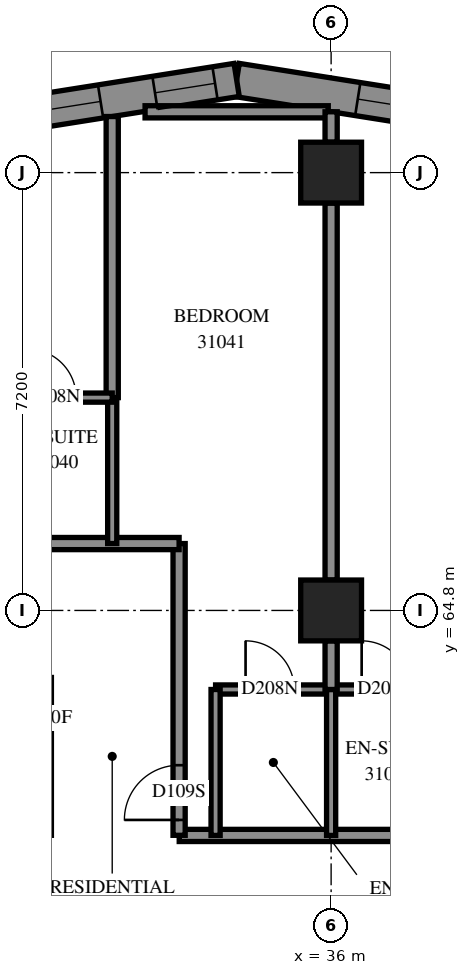
"""IFC4 building model, lengths in metres.
Left out: names, types, materials, properties, quantities, classifications, styles, units other than length and angle.
Written with IfcOpenShell. Run it as: python <this file> out.ifc"""

import sys

from ifc_helpers import new_model, si_unit, direction, frame, frame_2d, origin, origin_2d, place, context, subcontext, project, spatial, polyline, rectangle, outline, extrude, element, fill, save


model = new_model("IFC4")
c1 = context("Model", 3, precision=1e-05, world=origin(), true_north=direction((0.0, 1.0)))
c2 = subcontext(c1, "Body", "Model", "MODEL_VIEW")
j1 = project(units=[si_unit("LENGTHUNIT", "METRE"), si_unit("PLANEANGLEUNIT", "RADIAN")], contexts=[c1])
p1 = place(None, origin())
s1 = spatial("IfcSite", under=j1, at=p1, CompositionType="ELEMENT")
p2 = place(p1, origin())
s2 = spatial("IfcBuilding", under=s1, at=p2, CompositionType="ELEMENT")
p3 = place(p2, frame((0.0, 0.0, 115.2)))
s3 = spatial("IfcBuildingStorey", under=s2, at=p3, CompositionType="ELEMENT", Elevation=115.2)
for number, where, z_axis, x_axis in (
    (1, (36.0, 64.8, 0.0), (0.0, 0.0, 1.0), (1.0, 0.0, 0.0)),
    (2, (36.0, 72.0, 0.0), (0.0, 0.0, 1.0), (1.0, 0.0, 0.0)),
):
    element("IfcColumn", number, at=place(p3, frame(where, z_axis=z_axis, x_axis=x_axis)), inside=s3, PredefinedType="COLUMN", context=c2, shape_type="SweptSolid", body=[
        extrude(rectangle(XDim=1.0, YDim=1.0, at=origin_2d()), origin(), (0.0, 0.0, 1.0), 3.1),
    ])
p4 = place(p3, frame((38.259, 72.922, 0.0), z_axis=(0.0, 0.0, 1.0), x_axis=(-0.9877213372, 0.1562259905, 0.0)))
e3 = element("IfcWall", 3, at=p4, inside=s3, PredefinedType="SOLIDWALL", context=c2, shape_type="SweptSolid", body=[
    extrude(outline(polyline([(0.043, -0.275), (3.903, -0.275), (3.816, 0.275), (-0.043, 0.275), (0.043, -0.275)])), origin(), (0.0, 0.0, 1.0), 3.1),
])
p5 = place(p4, frame((0.643, 0.0, 0.5)))
e4 = element("IfcOpeningElement", 4, at=p5, cuts=e3, PredefinedType="OPENING", context=c2, shape_type="SweptSolid", body=[
    extrude(rectangle(XDim=1.2, YDim=2.45, at=frame_2d((0.6, 1.225))), frame((0.0, 0.285, 0.0), z_axis=(0.0, -1.0, 0.0), x_axis=(1.0, 0.0, 0.0)), (0.0, 0.0, 1.0), 0.57),
])
p6 = place(p3, frame((34.447, 73.525, 0.0), z_axis=(0.0, 0.0, 1.0), x_axis=(-0.9877213372, -0.1562259905, 0.0)))
e5 = element("IfcWall", 5, at=p6, inside=s3, PredefinedType="SOLIDWALL", context=c2, shape_type="SweptSolid", body=[
    extrude(outline(polyline([(-0.043, -0.275), (3.816, -0.275), (3.903, 0.275), (0.043, 0.275), (-0.043, -0.275)])), origin(), (0.0, 0.0, 1.0), 3.1),
])
p7 = place(p6, frame((2.266, 0.0, 0.5)))
e6 = element("IfcOpeningElement", 6, at=p7, cuts=e5, PredefinedType="OPENING", context=c2, shape_type="SweptSolid", body=[
    extrude(rectangle(XDim=1.2, YDim=2.45, at=frame_2d((0.6, 1.225))), frame((0.0, 0.285, 0.0), z_axis=(0.0, -1.0, 0.0), x_axis=(1.0, 0.0, 0.0)), (0.0, 0.0, 1.0), 0.57),
])
p8 = place(p6, frame((0.36, 0.0, 0.45)))
e7 = element("IfcOpeningElement", 7, at=p8, cuts=e5, PredefinedType="OPENING", context=c2, shape_type="SweptSolid", body=[
    extrude(rectangle(XDim=1.0, YDim=2.5, at=frame_2d((0.5, 1.25))), frame((0.0, 0.285, 0.0), z_axis=(0.0, -1.0, 0.0), x_axis=(1.0, 0.0, 0.0)), (0.0, 0.0, 1.0), 0.57),
])
p9 = place(p3, frame((33.502, 61.1, 0.0), z_axis=(0.0, 0.0, 1.0), x_axis=(1.0, 0.0, 0.0)))
e8 = element("IfcWall", 8, at=p9, inside=s3, PredefinedType="PARTITIONING", context=c2, shape_type="SweptSolid", body=[
    extrude(rectangle(XDim=21.198, YDim=0.2, at=frame_2d((10.599, 0.0))), origin(), (0.0, 0.0, 1.0), 3.1),
])
p10 = place(p9, frame((4.798, 0.0, 0.0)))
e9 = element("IfcOpeningElement", 9, at=p10, cuts=e8, PredefinedType="OPENING", context=c2, shape_type="SweptSolid", body=[
    extrude(rectangle(XDim=0.9, YDim=2.1, at=frame_2d((0.45, 1.05))), frame((0.0, 0.11, 0.0), z_axis=(0.0, -1.0, 0.0), x_axis=(1.0, 0.0, 0.0)), (0.0, 0.0, 1.0), 0.22),
])
p11 = place(p9, frame((6.498, 0.0, 0.0)))
e10 = element("IfcOpeningElement", 10, at=p11, cuts=e8, PredefinedType="OPENING", context=c2, shape_type="SweptSolid", body=[
    extrude(rectangle(XDim=0.9, YDim=2.1, at=frame_2d((0.45, 1.05))), frame((0.0, 0.11, 0.0), z_axis=(0.0, -1.0, 0.0), x_axis=(1.0, 0.0, 0.0)), (0.0, 0.0, 1.0), 0.22),
])
p12 = place(p9, frame((11.998, 0.0, 0.0)))
e11 = element("IfcOpeningElement", 11, at=p12, cuts=e8, PredefinedType="OPENING", context=c2, shape_type="SweptSolid", body=[
    extrude(rectangle(XDim=0.9, YDim=2.1, at=frame_2d((0.45, 1.05))), frame((0.0, 0.11, 0.0), z_axis=(0.0, -1.0, 0.0), x_axis=(1.0, 0.0, 0.0)), (0.0, 0.0, 1.0), 0.22),
])
p13 = place(p9, frame((13.698, 0.0, 0.0)))
e12 = element("IfcOpeningElement", 12, at=p13, cuts=e8, PredefinedType="OPENING", context=c2, shape_type="SweptSolid", body=[
    extrude(rectangle(XDim=0.9, YDim=2.1, at=frame_2d((0.45, 1.05))), frame((0.0, 0.11, 0.0), z_axis=(0.0, -1.0, 0.0), x_axis=(1.0, 0.0, 0.0)), (0.0, 0.0, 1.0), 0.22),
])
p14 = place(p9, frame((19.198, 0.0, 0.0)))
e13 = element("IfcOpeningElement", 13, at=p14, cuts=e8, PredefinedType="OPENING", context=c2, shape_type="SweptSolid", body=[
    extrude(rectangle(XDim=0.9, YDim=2.1, at=frame_2d((0.45, 1.05))), frame((0.0, 0.11, 0.0), z_axis=(0.0, -1.0, 0.0), x_axis=(1.0, 0.0, 0.0)), (0.0, 0.0, 1.0), 0.22),
])
p15 = place(p3, frame((36.0, 65.3, 0.0), z_axis=(0.0, 0.0, 1.0), x_axis=(0.0, 1.0, 0.0)))
e14 = element("IfcWall", 14, at=p15, inside=s3, PredefinedType="PARTITIONING", context=c2, shape_type="SweptSolid", body=[
    extrude(rectangle(XDim=6.2, YDim=0.2, at=frame_2d((3.1, 0.0))), origin(), (0.0, 0.0, 1.0), 3.1),
])
p16 = place(p3, frame((33.5, 61.102, 0.0), z_axis=(0.0, 0.0, 1.0), x_axis=(0.0, 1.0, 0.0)))
e15 = element("IfcWall", 15, at=p16, inside=s3, PredefinedType="PARTITIONING", context=c2, shape_type="SweptSolid", body=[
    extrude(rectangle(XDim=4.798, YDim=0.2, at=frame_2d((2.399, 0.0))), origin(), (0.0, 0.0, 1.0), 3.1),
])
p17 = place(p16, frame((0.253, 0.0, 0.0)))
e16 = element("IfcOpeningElement", 16, at=p17, cuts=e15, PredefinedType="OPENING", context=c2, shape_type="SweptSolid", body=[
    extrude(rectangle(XDim=0.9, YDim=2.1, at=frame_2d((0.45, 1.05))), frame((0.0, 0.11, 0.0), z_axis=(0.0, -1.0, 0.0), x_axis=(1.0, 0.0, 0.0)), (0.0, 0.0, 1.0), 0.22),
])
p18 = place(p3, frame((32.4, 68.3, 0.0), z_axis=(0.0, 0.0, 1.0), x_axis=(0.0, 1.0, 0.0)))
e17 = element("IfcWall", 17, at=p18, inside=s3, PredefinedType="PARTITIONING", context=c2, shape_type="SweptSolid", body=[
    extrude(rectangle(XDim=4.622, YDim=0.2, at=frame_2d((2.311, 0.0))), origin(), (0.0, 0.0, 1.0), 3.1),
])
p19 = place(p3, frame((34.1, 63.5, 0.0), z_axis=(0.0, 0.0, 1.0), x_axis=(1.0, 0.0, 0.0)))
e18 = element("IfcWall", 18, at=p19, inside=s3, PredefinedType="PARTITIONING", context=c2, shape_type="SweptSolid", body=[
    extrude(rectangle(XDim=3.8, YDim=0.15, at=frame_2d((1.9, 0.0))), origin(), (0.0, 0.0, 1.0), 3.1),
])
p20 = place(p19, frame((0.493, 0.0, 0.0)))
e19 = element("IfcOpeningElement", 19, at=p20, cuts=e18, PredefinedType="OPENING", context=c2, shape_type="SweptSolid", body=[
    extrude(rectangle(XDim=0.8, YDim=2.1, at=frame_2d((0.4, 1.05))), frame((0.0, 0.085, 0.0), z_axis=(0.0, -1.0, 0.0), x_axis=(1.0, 0.0, 0.0)), (0.0, 0.0, 1.0), 0.17),
])
p21 = place(p19, frame((2.402, 0.0, 0.0)))
e20 = element("IfcOpeningElement", 20, at=p21, cuts=e18, PredefinedType="OPENING", context=c2, shape_type="SweptSolid", body=[
    extrude(rectangle(XDim=0.8, YDim=2.1, at=frame_2d((0.4, 1.05))), frame((0.0, 0.085, 0.0), z_axis=(0.0, -1.0, 0.0), x_axis=(1.0, 0.0, 0.0)), (0.0, 0.0, 1.0), 0.17),
])
p22 = place(p3, frame((32.94, 73.0, 0.0), z_axis=(0.0, 0.0, 1.0), x_axis=(1.0, 0.0, 0.0)))
e21 = element("IfcWall", 21, at=p22, inside=s3, PredefinedType="PARTITIONING", context=c2, shape_type="SweptSolid", body=[
    extrude(rectangle(XDim=3.013, YDim=0.2, at=frame_2d((1.506, 0.0))), origin(), (0.0, 0.0, 1.0), 3.1),
])
p23 = place(p3, frame((30.552, 65.9, 0.0), z_axis=(0.0, 0.0, 1.0), x_axis=(1.0, 0.0, 0.0)))
e22 = element("IfcWall", 22, at=p23, inside=s3, PredefinedType="PARTITIONING", context=c2, shape_type="SweptSolid", body=[
    extrude(rectangle(XDim=2.948, YDim=0.2, at=frame_2d((1.474, 0.0))), origin(), (0.0, 0.0, 1.0), 3.1),
])
for number, where, z_axis, x_axis in (
    (23, (34.1, 61.1, 0.0), (0.0, 0.0, 1.0), (0.0, 1.0, 0.0)),
    (24, (36.0, 61.1, 0.0), (0.0, 0.0, 1.0), (0.0, 1.0, 0.0)),
    (25, (32.4, 65.9, 0.0), (0.0, 0.0, 1.0), (0.0, 1.0, 0.0)),
):
    element("IfcWall", number, at=place(p3, frame(where, z_axis=z_axis, x_axis=x_axis)), inside=s3, PredefinedType="PARTITIONING", context=c2, shape_type="SweptSolid", body=[
        extrude(rectangle(XDim=2.4, YDim=0.15, at=frame_2d((1.2, 0.0))), origin(), (0.0, 0.0, 1.0), 3.1),
    ])
p24 = place(p3, frame((30.5, 68.3, 0.0), z_axis=(0.0, 0.0, 1.0), x_axis=(1.0, 0.0, 0.0)))
e26 = element("IfcWall", 26, at=p24, inside=s3, PredefinedType="PARTITIONING", context=c2, shape_type="SweptSolid", body=[
    extrude(rectangle(XDim=1.9, YDim=0.15, at=frame_2d((0.95, 0.0))), origin(), (0.0, 0.0, 1.0), 3.1),
])
p25 = place(p24, frame((0.507, 0.0, 0.0)))
e27 = element("IfcOpeningElement", 27, at=p25, cuts=e26, PredefinedType="OPENING", context=c2, shape_type="SweptSolid", body=[
    extrude(rectangle(XDim=0.8, YDim=2.1, at=frame_2d((0.4, 1.05))), frame((0.0, 0.085, 0.0), z_axis=(0.0, -1.0, 0.0), x_axis=(1.0, 0.0, 0.0)), (0.0, 0.0, 1.0), 0.17),
])
p26 = place(p3, frame((36.0, 63.5, 0.0), z_axis=(0.0, 0.0, 1.0), x_axis=(0.0, 1.0, 0.0)))
e28 = element("IfcWall", 28, at=p26, inside=s3, PredefinedType="PARTITIONING", context=c2, shape_type="SweptSolid", body=[
    extrude(rectangle(XDim=0.8, YDim=0.2, at=frame_2d((0.4, 0.0))), origin(), (0.0, 0.0, 1.0), 3.1),
])
p27 = place(p3, frame((36.0, 72.5, 0.0), z_axis=(0.0, 0.0, 1.0), x_axis=(0.0, 1.0, 0.0)))
e29 = element("IfcWall", 29, at=p27, inside=s3, PredefinedType="PARTITIONING", context=c2, shape_type="SweptSolid", body=[
    extrude(rectangle(XDim=0.5, YDim=0.2, at=frame_2d((0.25, 0.0))), origin(), (0.0, 0.0, 1.0), 3.1),
])
p28 = place(p5, origin())
e30 = element("IfcWindow", 30, at=p28, inside=s3, PartitioningType="SINGLE_PANEL", PredefinedType="WINDOW", context=c2, shape_type="SweptSolid", body=[
    extrude(rectangle(XDim=1.2, YDim=2.45, at=frame_2d((0.6, 1.225))), frame((0.0, 0.155, 0.0), z_axis=(0.0, -1.0, 0.0), x_axis=(1.0, 0.0, 0.0)), (0.0, 0.0, 1.0), 0.06),
])
fill(e4, e30)
p29 = place(p7, origin())
e31 = element("IfcWindow", 31, at=p29, inside=s3, PartitioningType="SINGLE_PANEL", PredefinedType="WINDOW", context=c2, shape_type="SweptSolid", body=[
    extrude(rectangle(XDim=1.2, YDim=2.45, at=frame_2d((0.6, 1.225))), frame((0.0, 0.155, 0.0), z_axis=(0.0, -1.0, 0.0), x_axis=(1.0, 0.0, 0.0)), (0.0, 0.0, 1.0), 0.06),
])
fill(e6, e31)
p30 = place(p25, origin())
e32 = element("IfcDoor", 32, at=p30, inside=s3, OperationType="SINGLE_SWING_RIGHT", PredefinedType="DOOR", context=c2, shape_type="SweptSolid", body=[
    extrude(rectangle(XDim=0.8, YDim=2.1, at=frame_2d((0.4, 1.05))), frame((0.0, 0.025, 0.0), z_axis=(0.0, -1.0, 0.0), x_axis=(1.0, 0.0, 0.0)), (0.0, 0.0, 1.0), 0.05),
])
fill(e27, e32)
p31 = place(p17, origin())
e33 = element("IfcDoor", 33, at=p31, inside=s3, OperationType="SINGLE_SWING_LEFT", PredefinedType="DOOR", context=c2, shape_type="SweptSolid", body=[
    extrude(rectangle(XDim=0.9, YDim=2.1, at=frame_2d((0.45, 1.05))), frame((0.0, 0.025, 0.0), z_axis=(0.0, -1.0, 0.0), x_axis=(1.0, 0.0, 0.0)), (0.0, 0.0, 1.0), 0.05),
])
fill(e16, e33)
p32 = place(p20, origin())
e34 = element("IfcDoor", 34, at=p32, inside=s3, OperationType="SINGLE_SWING_RIGHT", PredefinedType="DOOR", context=c2, shape_type="SweptSolid", body=[
    extrude(rectangle(XDim=0.8, YDim=2.1, at=frame_2d((0.4, 1.05))), frame((0.0, 0.025, 0.0), z_axis=(0.0, -1.0, 0.0), x_axis=(1.0, 0.0, 0.0)), (0.0, 0.0, 1.0), 0.05),
])
fill(e19, e34)
p33 = place(p21, origin())
e35 = element("IfcDoor", 35, at=p33, inside=s3, OperationType="SINGLE_SWING_RIGHT", PredefinedType="DOOR", context=c2, shape_type="SweptSolid", body=[
    extrude(rectangle(XDim=0.8, YDim=2.1, at=frame_2d((0.4, 1.05))), frame((0.0, 0.025, 0.0), z_axis=(0.0, -1.0, 0.0), x_axis=(1.0, 0.0, 0.0)), (0.0, 0.0, 1.0), 0.05),
])
fill(e20, e35)
p34 = place(p8, origin())
e36 = element("IfcWindow", 36, at=p34, inside=s3, PartitioningType="SINGLE_PANEL", PredefinedType="WINDOW", context=c2, shape_type="SweptSolid", body=[
    extrude(rectangle(XDim=1.0, YDim=2.5, at=frame_2d((0.5, 1.25))), frame((0.0, 0.155, 0.0), z_axis=(0.0, -1.0, 0.0), x_axis=(1.0, 0.0, 0.0)), (0.0, 0.0, 1.0), 0.06),
])
fill(e7, e36)
save(model, sys.argv[1])
